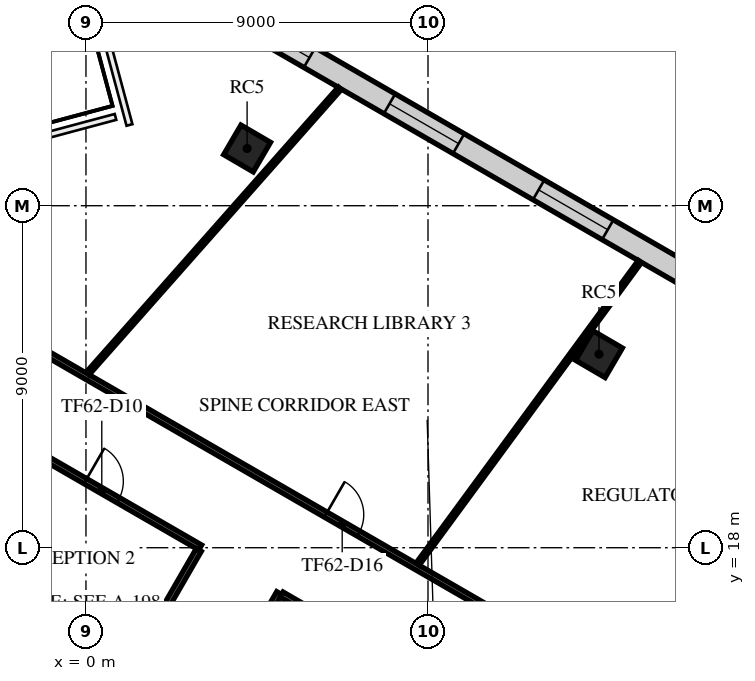
"""IFC4 building model, lengths in metres.
Left out: names, types, materials, properties, quantities, classifications, styles, units other than length and angle.
Written with IfcOpenShell. Run it as: python <this file> out.ifc"""

import sys

from ifc_helpers import new_model, si_unit, direction, frame, frame_2d, origin, origin_2d, place, context, subcontext, project, spatial, rectangle, extrude, element, fill, save


model = new_model("IFC4")
c1 = context("Model", 3, precision=1e-05, world=origin(), true_north=direction((0.0, 1.0)))
c2 = subcontext(c1, "Body", "Model", "MODEL_VIEW")
j1 = project(units=[si_unit("LENGTHUNIT", "METRE"), si_unit("PLANEANGLEUNIT", "RADIAN")], contexts=[c1])
p1 = place(None, origin())
s1 = spatial("IfcSite", under=j1, at=p1, CompositionType="ELEMENT")
p2 = place(p1, origin())
s2 = spatial("IfcBuilding", under=s1, at=p2, CompositionType="ELEMENT")
p3 = place(p2, frame((0.0, 0.0, 262.9)))
s3 = spatial("IfcBuildingStorey", under=s2, at=p3, CompositionType="ELEMENT", Elevation=262.9)
for number, where, z_axis, x_axis in (
    (1, (13.499, 23.094, 0.0), (0.0, 0.0, 1.0), (0.505, 0.863, 0.0)),
    (2, (4.24, 28.506, 0.0), (0.0, 0.0, 1.0), (0.505, 0.863, 0.0)),
):
    element("IfcColumn", number, at=place(p3, frame(where, z_axis=z_axis, x_axis=x_axis)), inside=s3, PredefinedType="COLUMN", context=c2, shape_type="SweptSolid", body=[
        extrude(rectangle(XDim=0.9, YDim=0.9, at=origin_2d()), origin(), (0.0, 0.0, 1.0), 4.0),
    ])
p4 = place(p3, frame((30.476, 16.699, 0.0), z_axis=(0.0, 0.0, 1.0), x_axis=(-0.866025061514, 0.500000592829, 0.0)))
e3 = element("IfcWall", 3, at=p4, inside=s3, PredefinedType="STANDARD", context=c2, shape_type="SweptSolid", body=[
    extrude(rectangle(XDim=36.243, YDim=0.6, at=frame_2d((18.122, 0.0))), origin(), (0.0, 0.0, 1.0), 3.64),
])
p5 = place(p4, frame((1.215, 0.0, 0.9)))
e4 = element("IfcOpeningElement", 4, at=p5, cuts=e3, PredefinedType="OPENING", context=c2, shape_type="SweptSolid", body=[
    extrude(rectangle(XDim=2.1, YDim=2.1, at=frame_2d((1.05, 1.05))), frame((0.0, 0.31, 0.0), z_axis=(0.0, -1.0, 0.0), x_axis=(1.0, 0.0, 0.0)), (0.0, 0.0, 1.0), 0.62),
])
p6 = place(p4, frame((5.746, 0.0, 0.9)))
e5 = element("IfcOpeningElement", 5, at=p6, cuts=e3, PredefinedType="OPENING", context=c2, shape_type="SweptSolid", body=[
    extrude(rectangle(XDim=2.1, YDim=2.1, at=frame_2d((1.05, 1.05))), frame((0.0, 0.31, 0.0), z_axis=(0.0, -1.0, 0.0), x_axis=(1.0, 0.0, 0.0)), (0.0, 0.0, 1.0), 0.62),
])
p7 = place(p4, frame((10.276, 0.0, 0.9)))
e6 = element("IfcOpeningElement", 6, at=p7, cuts=e3, PredefinedType="OPENING", context=c2, shape_type="SweptSolid", body=[
    extrude(rectangle(XDim=2.1, YDim=2.1, at=frame_2d((1.05, 1.05))), frame((0.0, 0.31, 0.0), z_axis=(0.0, -1.0, 0.0), x_axis=(1.0, 0.0, 0.0)), (0.0, 0.0, 1.0), 0.62),
])
p8 = place(p4, frame((14.806, 0.0, 0.9)))
e7 = element("IfcOpeningElement", 7, at=p8, cuts=e3, PredefinedType="OPENING", context=c2, shape_type="SweptSolid", body=[
    extrude(rectangle(XDim=2.1, YDim=2.1, at=frame_2d((1.05, 1.05))), frame((0.0, 0.31, 0.0), z_axis=(0.0, -1.0, 0.0), x_axis=(1.0, 0.0, 0.0)), (0.0, 0.0, 1.0), 0.62),
])
p9 = place(p4, frame((19.337, 0.0, 0.9)))
e8 = element("IfcOpeningElement", 8, at=p9, cuts=e3, PredefinedType="OPENING", context=c2, shape_type="SweptSolid", body=[
    extrude(rectangle(XDim=2.1, YDim=2.1, at=frame_2d((1.05, 1.05))), frame((0.0, 0.31, 0.0), z_axis=(0.0, -1.0, 0.0), x_axis=(1.0, 0.0, 0.0)), (0.0, 0.0, 1.0), 0.62),
])
p10 = place(p4, frame((23.867, 0.0, 0.9)))
e9 = element("IfcOpeningElement", 9, at=p10, cuts=e3, PredefinedType="OPENING", context=c2, shape_type="SweptSolid", body=[
    extrude(rectangle(XDim=2.1, YDim=2.1, at=frame_2d((1.05, 1.05))), frame((0.0, 0.31, 0.0), z_axis=(0.0, -1.0, 0.0), x_axis=(1.0, 0.0, 0.0)), (0.0, 0.0, 1.0), 0.62),
])
p11 = place(p4, frame((28.398, 0.0, 0.9)))
e10 = element("IfcOpeningElement", 10, at=p11, cuts=e3, PredefinedType="OPENING", context=c2, shape_type="SweptSolid", body=[
    extrude(rectangle(XDim=2.1, YDim=2.1, at=frame_2d((1.05, 1.05))), frame((0.0, 0.31, 0.0), z_axis=(0.0, -1.0, 0.0), x_axis=(1.0, 0.0, 0.0)), (0.0, 0.0, 1.0), 0.62),
])
p12 = place(p4, frame((32.928, 0.0, 0.9)))
e11 = element("IfcOpeningElement", 11, at=p12, cuts=e3, PredefinedType="OPENING", context=c2, shape_type="SweptSolid", body=[
    extrude(rectangle(XDim=2.1, YDim=2.1, at=frame_2d((1.05, 1.05))), frame((0.0, 0.31, 0.0), z_axis=(0.0, -1.0, 0.0), x_axis=(1.0, 0.0, 0.0)), (0.0, 0.0, 1.0), 0.62),
])
p13 = place(p3, frame((-8.447, 24.618, 0.0), z_axis=(0.0, 0.0, 1.0), x_axis=(0.866030646256, -0.499990919662, 0.0)))
e12 = element("IfcWall", 12, at=p13, inside=s3, PredefinedType="PARTITIONING", context=c2, shape_type="SweptSolid", body=[
    extrude(rectangle(XDim=13.225, YDim=0.15, at=frame_2d((6.612, 0.0))), origin(), (0.0, 0.0, 1.0), 3.04),
])
p14 = place(p13, frame((0.55, 0.0, 0.0)))
e13 = element("IfcOpeningElement", 13, at=p14, cuts=e12, PredefinedType="OPENING", context=c2, shape_type="SweptSolid", body=[
    extrude(rectangle(XDim=1.0, YDim=2.1, at=frame_2d((0.5, 1.05))), frame((0.0, 0.085, 0.0), z_axis=(0.0, -1.0, 0.0), x_axis=(1.0, 0.0, 0.0)), (0.0, 0.0, 1.0), 0.17),
])
p15 = place(p13, frame((9.735, 0.0, 0.0)))
e14 = element("IfcOpeningElement", 14, at=p15, cuts=e12, PredefinedType="OPENING", context=c2, shape_type="SweptSolid", body=[
    extrude(rectangle(XDim=1.0, YDim=2.1, at=frame_2d((0.5, 1.05))), frame((0.0, 0.085, 0.0), z_axis=(0.0, -1.0, 0.0), x_axis=(1.0, 0.0, 0.0)), (0.0, 0.0, 1.0), 0.17),
])
p16 = place(p3, frame((-7.247, 26.698, 0.0), z_axis=(0.0, 0.0, 1.0), x_axis=(0.866022442497, -0.500005129065, 0.0)))
e15 = element("IfcWall", 15, at=p16, inside=s3, PredefinedType="PARTITIONING", context=c2, shape_type="SweptSolid", body=[
    extrude(rectangle(XDim=39.325, YDim=0.15, at=frame_2d((19.662, 0.0))), origin(), (0.0, 0.0, 1.0), 3.04),
])
p17 = place(p16, frame((15.654, 0.0, 0.0)))
e16 = element("IfcOpeningElement", 16, at=p17, cuts=e15, PredefinedType="OPENING", context=c2, shape_type="SweptSolid", body=[
    extrude(rectangle(XDim=1.0, YDim=2.1, at=frame_2d((0.5, 1.05))), frame((0.0, 0.085, 0.0), z_axis=(0.0, -1.0, 0.0), x_axis=(1.0, 0.0, 0.0)), (0.0, 0.0, 1.0), 0.17),
])
p18 = place(p16, frame((23.442, 0.0, 0.0)))
e17 = element("IfcOpeningElement", 17, at=p18, cuts=e15, PredefinedType="OPENING", context=c2, shape_type="SweptSolid", body=[
    extrude(rectangle(XDim=1.0, YDim=2.1, at=frame_2d((0.5, 1.05))), frame((0.0, 0.085, 0.0), z_axis=(0.0, -1.0, 0.0), x_axis=(1.0, 0.0, 0.0)), (0.0, 0.0, 1.0), 0.17),
])
p19 = place(p16, frame((31.841, 0.0, 0.0)))
e18 = element("IfcOpeningElement", 18, at=p19, cuts=e15, PredefinedType="OPENING", context=c2, shape_type="SweptSolid", body=[
    extrude(rectangle(XDim=1.0, YDim=2.1, at=frame_2d((0.5, 1.05))), frame((0.0, 0.085, 0.0), z_axis=(0.0, -1.0, 0.0), x_axis=(1.0, 0.0, 0.0)), (0.0, 0.0, 1.0), 0.17),
])
p20 = place(p16, frame((36.955, 0.0, 0.0)))
e19 = element("IfcOpeningElement", 19, at=p20, cuts=e15, PredefinedType="OPENING", context=c2, shape_type="SweptSolid", body=[
    extrude(rectangle(XDim=1.0, YDim=2.1, at=frame_2d((0.5, 1.05))), frame((0.0, 0.085, 0.0), z_axis=(0.0, -1.0, 0.0), x_axis=(1.0, 0.0, 0.0)), (0.0, 0.0, 1.0), 0.17),
])
p21 = place(p3, frame((1.566, 15.512, 0.0), z_axis=(0.0, 0.0, 1.0), x_axis=(0.500136902793, 0.865946348491, 0.0)))
e20 = element("IfcWall", 20, at=p21, inside=s3, PredefinedType="PARTITIONING", context=c2, shape_type="SweptSolid", body=[
    extrude(rectangle(XDim=2.804, YDim=0.15, at=frame_2d((1.402, 0.0))), origin(), (0.0, 0.0, 1.0), 3.64),
])
p22 = place(p3, frame((2.627, 12.55, 0.0), z_axis=(0.0, 0.0, 1.0), x_axis=(0.50013524008, 0.865947308807, 0.0)))
e21 = element("IfcWall", 21, at=p22, inside=s3, PredefinedType="PARTITIONING", context=c2, shape_type="SweptSolid", body=[
    extrude(rectangle(XDim=4.915, YDim=0.15, at=frame_2d((2.458, 0.0))), origin(), (0.0, 0.0, 1.0), 3.24),
])
p23 = place(p3, frame((5.15, 16.769, 0.0), z_axis=(0.0, 0.0, 1.0), x_axis=(0.866010168016, -0.500026388196, 0.0)))
e22 = element("IfcWall", 22, at=p23, inside=s3, PredefinedType="PARTITIONING", context=c2, shape_type="SweptSolid", body=[
    extrude(rectangle(XDim=8.437, YDim=0.15, at=frame_2d((4.218, 0.0))), origin(), (0.0, 0.0, 1.0), 3.24),
])
p24 = place(p23, frame((3.3, 0.0, 0.0)))
e23 = element("IfcOpeningElement", 23, at=p24, cuts=e22, PredefinedType="OPENING", context=c2, shape_type="SweptSolid", body=[
    extrude(rectangle(XDim=1.0, YDim=2.1, at=frame_2d((0.5, 1.05))), frame((0.0, 0.085, 0.0), z_axis=(0.0, -1.0, 0.0), x_axis=(1.0, 0.0, 0.0)), (0.0, 0.0, 1.0), 0.17),
])
p25 = place(p3, frame((0.045, 22.586, 0.0), z_axis=(0.0, 0.0, 1.0), x_axis=(0.662385571542, 0.749163102811, 0.0)))
e24 = element("IfcWall", 24, at=p25, inside=s3, PredefinedType="PARTITIONING", context=c2, shape_type="SweptSolid", body=[
    extrude(rectangle(XDim=10.016, YDim=0.1, at=frame_2d((5.008, 0.0))), origin(), (0.0, 0.0, 1.0), 3.04),
])
p26 = place(p3, frame((8.728, 17.567, 0.0), z_axis=(0.0, 0.0, 1.0), x_axis=(0.591764258376, 0.806111073307, 0.0)))
e25 = element("IfcWall", 25, at=p26, inside=s3, PredefinedType="PARTITIONING", context=c2, shape_type="SweptSolid", body=[
    extrude(rectangle(XDim=9.88, YDim=0.1, at=frame_2d((4.94, 0.0))), origin(), (0.0, 0.0, 1.0), 3.04),
])
p27 = place(p9, origin())
e26 = element("IfcWindow", 26, at=p27, inside=s3, PartitioningType="SINGLE_PANEL", PredefinedType="WINDOW", context=c2, shape_type="SweptSolid", body=[
    extrude(rectangle(XDim=2.1, YDim=2.1, at=frame_2d((1.05, 1.05))), frame((0.0, 0.03, 0.0), z_axis=(0.0, -1.0, 0.0), x_axis=(1.0, 0.0, 0.0)), (0.0, 0.0, 1.0), 0.06),
])
fill(e8, e26)
p28 = place(p10, origin())
e27 = element("IfcWindow", 27, at=p28, inside=s3, PartitioningType="SINGLE_PANEL", PredefinedType="WINDOW", context=c2, shape_type="SweptSolid", body=[
    extrude(rectangle(XDim=2.1, YDim=2.1, at=frame_2d((1.05, 1.05))), frame((0.0, 0.03, 0.0), z_axis=(0.0, -1.0, 0.0), x_axis=(1.0, 0.0, 0.0)), (0.0, 0.0, 1.0), 0.06),
])
fill(e9, e27)
p29 = place(p11, origin())
e28 = element("IfcWindow", 28, at=p29, inside=s3, PartitioningType="SINGLE_PANEL", PredefinedType="WINDOW", context=c2, shape_type="SweptSolid", body=[
    extrude(rectangle(XDim=2.1, YDim=2.1, at=frame_2d((1.05, 1.05))), frame((0.0, 0.03, 0.0), z_axis=(0.0, -1.0, 0.0), x_axis=(1.0, 0.0, 0.0)), (0.0, 0.0, 1.0), 0.06),
])
fill(e10, e28)
p30 = place(p15, frame((1.0, 0.0, 0.0), z_axis=(0.0, 0.0, 1.0), x_axis=(-1.0, 0.0, 0.0)))
e29 = element("IfcDoor", 29, at=p30, inside=s3, OperationType="SINGLE_SWING_LEFT", PredefinedType="DOOR", context=c2, shape_type="SweptSolid", body=[
    extrude(rectangle(XDim=1.0, YDim=2.1, at=frame_2d((0.5, 1.05))), frame((0.0, 0.025, 0.0), z_axis=(0.0, -1.0, 0.0), x_axis=(1.0, 0.0, 0.0)), (0.0, 0.0, 1.0), 0.05),
])
fill(e14, e29)
p31 = place(p17, origin())
e30 = element("IfcDoor", 30, at=p31, inside=s3, OperationType="SINGLE_SWING_RIGHT", PredefinedType="DOOR", context=c2, shape_type="SweptSolid", body=[
    extrude(rectangle(XDim=1.0, YDim=2.1, at=frame_2d((0.5, 1.05))), frame((0.0, 0.025, 0.0), z_axis=(0.0, -1.0, 0.0), x_axis=(1.0, 0.0, 0.0)), (0.0, 0.0, 1.0), 0.05),
])
fill(e16, e30)
save(model, sys.argv[1])
